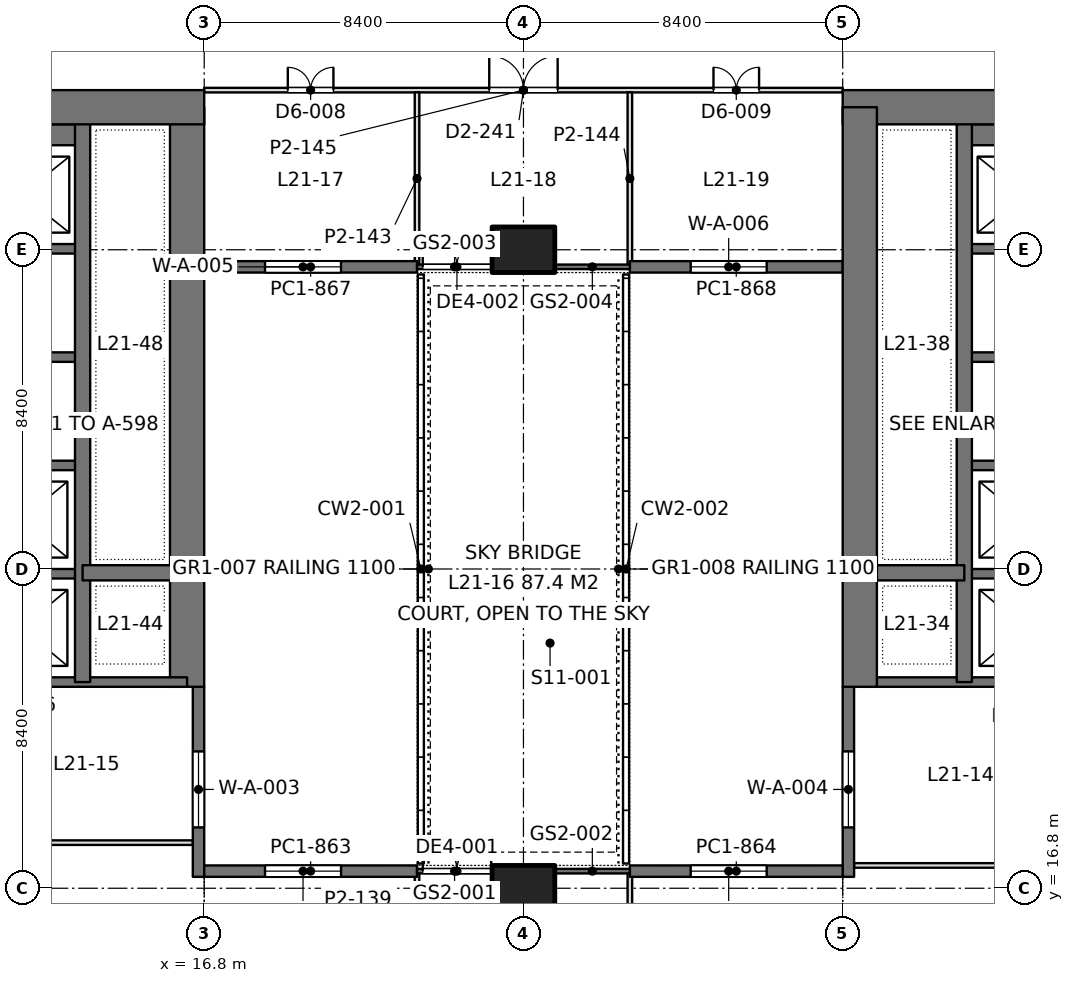
"""IFC4 building model, lengths in metres.
Left out: names, types, materials, properties, quantities, classifications, styles, units other than length and angle.
Written with IfcOpenShell. Run it as: python <this file> out.ifc"""

import sys

from ifc_helpers import new_model, si_unit, direction, frame, frame_2d, origin, origin_2d, place, context, subcontext, project, spatial, rectangle, extrude, element, fill, save


model = new_model("IFC4")
c1 = context("Model", 3, precision=1e-05, world=origin(), true_north=direction((0.0, 1.0)))
c2 = subcontext(c1, "Body", "Model", "MODEL_VIEW")
j1 = project(units=[si_unit("LENGTHUNIT", "METRE"), si_unit("PLANEANGLEUNIT", "RADIAN")], contexts=[c1])
p1 = place(None, origin())
s1 = spatial("IfcSite", under=j1, at=p1, CompositionType="ELEMENT")
p2 = place(p1, origin())
s2 = spatial("IfcBuilding", under=s1, at=p2, CompositionType="ELEMENT")
p3 = place(p2, frame((0.0, 0.0, 96.3)))
s3 = spatial("IfcBuildingStorey", under=s2, at=p3, CompositionType="ELEMENT", Elevation=96.3)
for number, where, z_axis, x_axis in (
    (1, (25.2, 16.8, 0.0), (0.0, 0.0, 1.0), (1.0, 0.0, 0.0)),
    (2, (25.2, 33.6, 0.0), (0.0, 0.0, 1.0), (1.0, 0.0, 0.0)),
):
    element("IfcColumn", number, at=place(p3, frame(where, z_axis=z_axis, x_axis=x_axis)), inside=s3, PredefinedType="COLUMN", context=c2, shape_type="SweptSolid", body=[
        extrude(rectangle(XDim=1.65, YDim=1.2, at=origin_2d()), origin(), (0.0, 0.0, 1.0), 4.5),
    ])
p4 = place(p3, frame((-1.2, 37.35, 0.0), z_axis=(0.0, 0.0, 1.0), x_axis=(1.0, 0.0, 0.0)))
e3 = element("IfcWall", 3, at=p4, inside=s3, PredefinedType="SHEAR", context=c2, shape_type="SweptSolid", body=[
    extrude(rectangle(XDim=18.0, YDim=0.9, at=frame_2d((9.0, 0.0))), origin(), (0.0, 0.0, 1.0), 4.5),
])
p5 = place(p4, frame((8.95, 0.0, 0.0)))
e4 = element("IfcOpeningElement", 4, at=p5, cuts=e3, PredefinedType="OPENING", context=c2, shape_type="SweptSolid", body=[
    extrude(rectangle(XDim=1.8, YDim=2.4, at=frame_2d((0.9, 1.2))), frame((0.0, 0.46, 0.0), z_axis=(0.0, -1.0, 0.0), x_axis=(1.0, 0.0, 0.0)), (0.0, 0.0, 1.0), 0.92),
])
p6 = place(p3, frame((16.35, 22.1, 0.0), z_axis=(0.0, 0.0, 1.0), x_axis=(0.0, 1.0, 0.0)))
e5 = element("IfcWall", 5, at=p6, inside=s3, PredefinedType="SHEAR", context=c2, shape_type="SweptSolid", body=[
    extrude(rectangle(XDim=15.25, YDim=0.9, at=frame_2d((7.625, 0.0))), origin(), (0.0, 0.0, 1.0), 4.5),
])
p7 = place(p3, frame((13.6, 22.225, 0.0), z_axis=(0.0, 0.0, 1.0), x_axis=(0.0, 1.0, 0.0)))
e6 = element("IfcWall", 6, at=p7, inside=s3, PredefinedType="SHEAR", context=c2, shape_type="SweptSolid", body=[
    extrude(rectangle(XDim=15.125, YDim=0.4, at=frame_2d((7.562, 0.0))), origin(), (0.0, 0.0, 1.0), 4.5),
])
p8 = place(p3, frame((13.6, 25.1, 0.0), z_axis=(0.0, 0.0, 1.0), x_axis=(1.0, 0.0, 0.0)))
e7 = element("IfcWall", 7, at=p8, inside=s3, PredefinedType="SHEAR", context=c2, shape_type="SweptSolid", body=[
    extrude(rectangle(XDim=2.75, YDim=0.4, at=frame_2d((1.375, 0.0))), origin(), (0.0, 0.0, 1.0), 4.5),
])
p9 = place(p3, frame((10.4, 22.225, 0.0), z_axis=(0.0, 0.0, 1.0), x_axis=(1.0, 0.0, 0.0)))
e8 = element("IfcWall", 8, at=p9, inside=s3, PredefinedType="SHEAR", context=c2, shape_type="SweptSolid", body=[
    extrude(rectangle(XDim=5.95, YDim=0.25, at=frame_2d((2.975, 0.0))), origin(), (0.0, 0.0, 1.0), 4.5),
])
for number, where, z_axis, x_axis in (
    (9, (10.4, 25.075, 0.0), (0.0, 0.0, 1.0), (1.0, 0.0, 0.0)),
    (10, (10.4, 27.925, 0.0), (0.0, 0.0, 1.0), (1.0, 0.0, 0.0)),
    (11, (10.4, 30.775, 0.0), (0.0, 0.0, 1.0), (1.0, 0.0, 0.0)),
    (12, (10.4, 33.625, 0.0), (0.0, 0.0, 1.0), (1.0, 0.0, 0.0)),
):
    element("IfcWall", number, at=place(p3, frame(where, z_axis=z_axis, x_axis=x_axis)), inside=s3, PredefinedType="SHEAR", context=c2, shape_type="SweptSolid", body=[
        extrude(rectangle(XDim=3.2, YDim=0.25, at=frame_2d((1.6, 0.0))), origin(), (0.0, 0.0, 1.0), 4.5),
    ])
p10 = place(p3, frame((10.4, 36.625, 0.0), z_axis=(0.0, 0.0, 1.0), x_axis=(1.0, 0.0, 0.0)))
e13 = element("IfcWall", 13, at=p10, inside=s3, PredefinedType="SHEAR", context=c2, shape_type="SweptSolid", body=[
    extrude(rectangle(XDim=3.2, YDim=0.55, at=frame_2d((1.6, 0.0))), origin(), (0.0, 0.0, 1.0), 4.5),
])
p11 = place(p3, frame((33.6, 37.35, 0.0), z_axis=(0.0, 0.0, 1.0), x_axis=(1.0, 0.0, 0.0)))
e14 = element("IfcWall", 14, at=p11, inside=s3, PredefinedType="SHEAR", context=c2, shape_type="SweptSolid", body=[
    extrude(rectangle(XDim=18.0, YDim=0.9, at=frame_2d((9.0, 0.0))), origin(), (0.0, 0.0, 1.0), 4.5),
])
p12 = place(p11, frame((7.25, 0.0, 0.0)))
e15 = element("IfcOpeningElement", 15, at=p12, cuts=e14, PredefinedType="OPENING", context=c2, shape_type="SweptSolid", body=[
    extrude(rectangle(XDim=1.8, YDim=2.4, at=frame_2d((0.9, 1.2))), frame((0.0, 0.46, 0.0), z_axis=(0.0, -1.0, 0.0), x_axis=(1.0, 0.0, 0.0)), (0.0, 0.0, 1.0), 0.92),
])
p13 = place(p3, frame((34.05, 22.1, 0.0), z_axis=(0.0, 0.0, 1.0), x_axis=(0.0, 1.0, 0.0)))
e16 = element("IfcWall", 16, at=p13, inside=s3, PredefinedType="SHEAR", context=c2, shape_type="SweptSolid", body=[
    extrude(rectangle(XDim=15.25, YDim=0.9, at=frame_2d((7.625, 0.0))), origin(), (0.0, 0.0, 1.0), 4.5),
])
p14 = place(p3, frame((36.8, 22.225, 0.0), z_axis=(0.0, 0.0, 1.0), x_axis=(0.0, 1.0, 0.0)))
e17 = element("IfcWall", 17, at=p14, inside=s3, PredefinedType="SHEAR", context=c2, shape_type="SweptSolid", body=[
    extrude(rectangle(XDim=15.125, YDim=0.4, at=frame_2d((7.562, 0.0))), origin(), (0.0, 0.0, 1.0), 4.5),
])
p15 = place(p3, frame((36.8, 25.1, 0.0), z_axis=(0.0, 0.0, 1.0), x_axis=(-1.0, 0.0, 0.0)))
e18 = element("IfcWall", 18, at=p15, inside=s3, PredefinedType="SHEAR", context=c2, shape_type="SweptSolid", body=[
    extrude(rectangle(XDim=2.75, YDim=0.4, at=frame_2d((1.375, 0.0))), origin(), (0.0, 0.0, 1.0), 4.5),
])
p16 = place(p3, frame((40.0, 22.225, 0.0), z_axis=(0.0, 0.0, 1.0), x_axis=(-1.0, 0.0, 0.0)))
e19 = element("IfcWall", 19, at=p16, inside=s3, PredefinedType="SHEAR", context=c2, shape_type="SweptSolid", body=[
    extrude(rectangle(XDim=5.95, YDim=0.25, at=frame_2d((2.975, 0.0))), origin(), (0.0, 0.0, 1.0), 4.5),
])
for number, where, z_axis, x_axis in (
    (20, (40.0, 25.075, 0.0), (0.0, 0.0, 1.0), (-1.0, 0.0, 0.0)),
    (21, (40.0, 27.925, 0.0), (0.0, 0.0, 1.0), (-1.0, 0.0, 0.0)),
    (22, (40.0, 30.775, 0.0), (0.0, 0.0, 1.0), (-1.0, 0.0, 0.0)),
    (23, (40.0, 33.625, 0.0), (0.0, 0.0, 1.0), (-1.0, 0.0, 0.0)),
):
    element("IfcWall", number, at=place(p3, frame(where, z_axis=z_axis, x_axis=x_axis)), inside=s3, PredefinedType="SHEAR", context=c2, shape_type="SweptSolid", body=[
        extrude(rectangle(XDim=3.2, YDim=0.25, at=frame_2d((1.6, 0.0))), origin(), (0.0, 0.0, 1.0), 4.5),
    ])
p17 = place(p3, frame((40.0, 36.625, 0.0), z_axis=(0.0, 0.0, 1.0), x_axis=(-1.0, 0.0, 0.0)))
e24 = element("IfcWall", 24, at=p17, inside=s3, PredefinedType="SHEAR", context=c2, shape_type="SweptSolid", body=[
    extrude(rectangle(XDim=3.2, YDim=0.55, at=frame_2d((1.6, 0.0))), origin(), (0.0, 0.0, 1.0), 4.5),
])
p18 = place(p3, frame((16.65, 17.1, 0.0), z_axis=(0.0, 0.0, 1.0), x_axis=(0.0, 1.0, 0.0)))
e25 = element("IfcWall", 25, at=p18, inside=s3, PredefinedType="SOLIDWALL", context=c2, shape_type="SweptSolid", body=[
    extrude(rectangle(XDim=5.0, YDim=0.3, at=frame_2d((2.5, 0.0))), origin(), (0.0, 0.0, 1.0), 4.35),
])
p19 = place(p18, frame((1.3, 0.0, 0.1)))
e26 = element("IfcOpeningElement", 26, at=p19, cuts=e25, PredefinedType="OPENING", context=c2, shape_type="SweptSolid", body=[
    extrude(rectangle(XDim=2.0, YDim=3.0, at=frame_2d((1.0, 1.5))), frame((0.0, 0.16, 0.0), z_axis=(0.0, -1.0, 0.0), x_axis=(1.0, 0.0, 0.0)), (0.0, 0.0, 1.0), 0.32),
])
p20 = place(p3, frame((33.75, 17.1, 0.0), z_axis=(0.0, 0.0, 1.0), x_axis=(0.0, 1.0, 0.0)))
e27 = element("IfcWall", 27, at=p20, inside=s3, PredefinedType="SOLIDWALL", context=c2, shape_type="SweptSolid", body=[
    extrude(rectangle(XDim=5.0, YDim=0.3, at=frame_2d((2.5, 0.0))), origin(), (0.0, 0.0, 1.0), 4.35),
])
p21 = place(p20, frame((1.3, 0.0, 0.1)))
e28 = element("IfcOpeningElement", 28, at=p21, cuts=e27, PredefinedType="OPENING", context=c2, shape_type="SweptSolid", body=[
    extrude(rectangle(XDim=2.0, YDim=3.0, at=frame_2d((1.0, 1.5))), frame((0.0, 0.16, 0.0), z_axis=(0.0, -1.0, 0.0), x_axis=(1.0, 0.0, 0.0)), (0.0, 0.0, 1.0), 0.32),
])
p22 = place(p3, frame((16.8, 17.25, 0.0), z_axis=(0.0, 0.0, 1.0), x_axis=(1.0, 0.0, 0.0)))
e29 = element("IfcWall", 29, at=p22, inside=s3, PredefinedType="SOLIDWALL", context=c2, shape_type="SweptSolid", body=[
    extrude(rectangle(XDim=5.6, YDim=0.3, at=frame_2d((2.8, 0.0))), origin(), (0.0, 0.0, 1.0), 4.35),
])
p23 = place(p22, frame((1.6, 0.0, 0.1)))
e30 = element("IfcOpeningElement", 30, at=p23, cuts=e29, PredefinedType="OPENING", context=c2, shape_type="SweptSolid", body=[
    extrude(rectangle(XDim=2.0, YDim=3.0, at=frame_2d((1.0, 1.5))), frame((0.0, 0.16, 0.0), z_axis=(0.0, -1.0, 0.0), x_axis=(1.0, 0.0, 0.0)), (0.0, 0.0, 1.0), 0.32),
])
p24 = place(p3, frame((22.4, 17.25, 0.0), z_axis=(0.0, 0.0, 1.0), x_axis=(1.0, 0.0, 0.0)))
e31 = element("IfcWall", 31, at=p24, inside=s3, PredefinedType="SOLIDWALL", context=c2, shape_type="SweptSolid", body=[
    extrude(rectangle(XDim=1.975, YDim=0.12, at=frame_2d((0.988, 0.0))), origin(), (0.0, 0.0, 1.0), 4.35),
])
p25 = place(p24, frame((0.15, 0.0, 0.0)))
e32 = element("IfcOpeningElement", 32, at=p25, cuts=e31, PredefinedType="OPENING", context=c2, shape_type="SweptSolid", body=[
    extrude(rectangle(XDim=1.8, YDim=2.4, at=frame_2d((0.9, 1.2))), frame((0.0, 0.07, 0.0), z_axis=(0.0, -1.0, 0.0), x_axis=(1.0, 0.0, 0.0)), (0.0, 0.0, 1.0), 0.14),
])
p26 = place(p3, frame((26.025, 17.25, 0.0), z_axis=(0.0, 0.0, 1.0), x_axis=(1.0, 0.0, 0.0)))
e33 = element("IfcWall", 33, at=p26, inside=s3, PredefinedType="SOLIDWALL", context=c2, shape_type="SweptSolid", body=[
    extrude(rectangle(XDim=1.975, YDim=0.12, at=frame_2d((0.988, 0.0))), origin(), (0.0, 0.0, 1.0), 4.35),
])
p27 = place(p3, frame((28.0, 17.25, 0.0), z_axis=(0.0, 0.0, 1.0), x_axis=(1.0, 0.0, 0.0)))
e34 = element("IfcWall", 34, at=p27, inside=s3, PredefinedType="SOLIDWALL", context=c2, shape_type="SweptSolid", body=[
    extrude(rectangle(XDim=5.6, YDim=0.3, at=frame_2d((2.8, 0.0))), origin(), (0.0, 0.0, 1.0), 4.35),
])
p28 = place(p27, frame((1.6, 0.0, 0.1)))
e35 = element("IfcOpeningElement", 35, at=p28, cuts=e34, PredefinedType="OPENING", context=c2, shape_type="SweptSolid", body=[
    extrude(rectangle(XDim=2.0, YDim=3.0, at=frame_2d((1.0, 1.5))), frame((0.0, 0.16, 0.0), z_axis=(0.0, -1.0, 0.0), x_axis=(1.0, 0.0, 0.0)), (0.0, 0.0, 1.0), 0.32),
])
p29 = place(p3, frame((16.8, 33.15, 0.0), z_axis=(0.0, 0.0, 1.0), x_axis=(1.0, 0.0, 0.0)))
e36 = element("IfcWall", 36, at=p29, inside=s3, PredefinedType="SOLIDWALL", context=c2, shape_type="SweptSolid", body=[
    extrude(rectangle(XDim=5.6, YDim=0.3, at=frame_2d((2.8, 0.0))), origin(), (0.0, 0.0, 1.0), 4.35),
])
p30 = place(p29, frame((1.6, 0.0, 0.1)))
e37 = element("IfcOpeningElement", 37, at=p30, cuts=e36, PredefinedType="OPENING", context=c2, shape_type="SweptSolid", body=[
    extrude(rectangle(XDim=2.0, YDim=3.0, at=frame_2d((1.0, 1.5))), frame((0.0, 0.16, 0.0), z_axis=(0.0, -1.0, 0.0), x_axis=(1.0, 0.0, 0.0)), (0.0, 0.0, 1.0), 0.32),
])
p31 = place(p3, frame((22.4, 33.15, 0.0), z_axis=(0.0, 0.0, 1.0), x_axis=(1.0, 0.0, 0.0)))
e38 = element("IfcWall", 38, at=p31, inside=s3, PredefinedType="SOLIDWALL", context=c2, shape_type="SweptSolid", body=[
    extrude(rectangle(XDim=1.975, YDim=0.12, at=frame_2d((0.988, 0.0))), origin(), (0.0, 0.0, 1.0), 4.35),
])
p32 = place(p31, frame((0.15, 0.0, 0.0)))
e39 = element("IfcOpeningElement", 39, at=p32, cuts=e38, PredefinedType="OPENING", context=c2, shape_type="SweptSolid", body=[
    extrude(rectangle(XDim=1.8, YDim=2.4, at=frame_2d((0.9, 1.2))), frame((0.0, 0.07, 0.0), z_axis=(0.0, -1.0, 0.0), x_axis=(1.0, 0.0, 0.0)), (0.0, 0.0, 1.0), 0.14),
])
p33 = place(p3, frame((26.025, 33.15, 0.0), z_axis=(0.0, 0.0, 1.0), x_axis=(1.0, 0.0, 0.0)))
e40 = element("IfcWall", 40, at=p33, inside=s3, PredefinedType="SOLIDWALL", context=c2, shape_type="SweptSolid", body=[
    extrude(rectangle(XDim=1.975, YDim=0.12, at=frame_2d((0.988, 0.0))), origin(), (0.0, 0.0, 1.0), 4.35),
])
p34 = place(p3, frame((28.0, 33.15, 0.0), z_axis=(0.0, 0.0, 1.0), x_axis=(1.0, 0.0, 0.0)))
e41 = element("IfcWall", 41, at=p34, inside=s3, PredefinedType="SOLIDWALL", context=c2, shape_type="SweptSolid", body=[
    extrude(rectangle(XDim=5.6, YDim=0.3, at=frame_2d((2.8, 0.0))), origin(), (0.0, 0.0, 1.0), 4.35),
])
p35 = place(p34, frame((1.6, 0.0, 0.1)))
e42 = element("IfcOpeningElement", 42, at=p35, cuts=e41, PredefinedType="OPENING", context=c2, shape_type="SweptSolid", body=[
    extrude(rectangle(XDim=2.0, YDim=3.0, at=frame_2d((1.0, 1.5))), frame((0.0, 0.16, 0.0), z_axis=(0.0, -1.0, 0.0), x_axis=(1.0, 0.0, 0.0)), (0.0, 0.0, 1.0), 0.32),
])
for number, where, z_axis, x_axis in (
    (43, (10.598, 18.0, 0.0), (0.0, 0.0, 1.0), (1.0, 0.0, 0.0)),
    (44, (33.898, 17.4, 0.0), (0.0, 0.0, 1.0), (1.0, 0.0, 0.0)),
):
    element("IfcWall", number, at=place(p3, frame(where, z_axis=z_axis, x_axis=x_axis)), inside=s3, PredefinedType="PARTITIONING", context=c2, shape_type="SweptSolid", body=[
        extrude(rectangle(XDim=5.904, YDim=0.12, at=frame_2d((2.952, 0.0))), origin(), (0.0, 0.0, 1.0), 3.85),
    ])
for number, where, z_axis, x_axis in (
    (45, (22.4, 12.658, 0.0), (0.0, 0.0, 1.0), (0.0, 1.0, 0.0)),
    (46, (28.0, 12.658, 0.0), (0.0, 0.0, 1.0), (0.0, 1.0, 0.0)),
):
    element("IfcWall", number, at=place(p3, frame(where, z_axis=z_axis, x_axis=x_axis)), inside=s3, PredefinedType="PARTITIONING", context=c2, shape_type="SweptSolid", body=[
        extrude(rectangle(XDim=4.534, YDim=0.12, at=frame_2d((2.267, 0.0))), origin(), (0.0, 0.0, 1.0), 3.5),
    ])
p36 = place(p3, frame((16.798, 37.8, 0.0), z_axis=(0.0, 0.0, 1.0), x_axis=(1.0, 0.0, 0.0)))
e47 = element("IfcWall", 47, at=p36, inside=s3, PredefinedType="PARTITIONING", context=c2, shape_type="SweptSolid", body=[
    extrude(rectangle(XDim=16.804, YDim=0.12, at=frame_2d((8.402, 0.0))), origin(), (0.0, 0.0, 1.0), 3.85),
])
p37 = place(p36, frame((2.202, 0.0, 0.0)))
e48 = element("IfcOpeningElement", 48, at=p37, cuts=e47, PredefinedType="OPENING", context=c2, shape_type="SweptSolid", body=[
    extrude(rectangle(XDim=1.2, YDim=2.2, at=frame_2d((0.6, 1.1))), frame((0.0, 0.07, 0.0), z_axis=(0.0, -1.0, 0.0), x_axis=(1.0, 0.0, 0.0)), (0.0, 0.0, 1.0), 0.14),
])
p38 = place(p36, frame((7.502, 0.0, 0.0)))
e49 = element("IfcOpeningElement", 49, at=p38, cuts=e47, PredefinedType="OPENING", context=c2, shape_type="SweptSolid", body=[
    extrude(rectangle(XDim=1.8, YDim=2.2, at=frame_2d((0.9, 1.1))), frame((0.0, 0.07, 0.0), z_axis=(0.0, -1.0, 0.0), x_axis=(1.0, 0.0, 0.0)), (0.0, 0.0, 1.0), 0.14),
])
p39 = place(p36, frame((13.402, 0.0, 0.0)))
e50 = element("IfcOpeningElement", 50, at=p39, cuts=e47, PredefinedType="OPENING", context=c2, shape_type="SweptSolid", body=[
    extrude(rectangle(XDim=1.2, YDim=2.2, at=frame_2d((0.6, 1.1))), frame((0.0, 0.07, 0.0), z_axis=(0.0, -1.0, 0.0), x_axis=(1.0, 0.0, 0.0)), (0.0, 0.0, 1.0), 0.14),
])
for number, where, z_axis, x_axis in (
    (51, (22.4, 33.208, 0.0), (0.0, 0.0, 1.0), (0.0, 1.0, 0.0)),
    (52, (28.0, 33.208, 0.0), (0.0, 0.0, 1.0), (0.0, 1.0, 0.0)),
):
    element("IfcWall", number, at=place(p3, frame(where, z_axis=z_axis, x_axis=x_axis)), inside=s3, PredefinedType="PARTITIONING", context=c2, shape_type="SweptSolid", body=[
        extrude(rectangle(XDim=4.534, YDim=0.12, at=frame_2d((2.267, 0.0))), origin(), (0.0, 0.0, 1.0), 3.5),
    ])
p40 = place(p19, origin())
e53 = element("IfcWindow", 53, at=p40, inside=s3, PartitioningType="SINGLE_PANEL", PredefinedType="WINDOW", context=c2, shape_type="SweptSolid", body=[
    extrude(rectangle(XDim=2.0, YDim=3.0, at=frame_2d((1.0, 1.5))), frame((0.0, 0.03, 0.0), z_axis=(0.0, -1.0, 0.0), x_axis=(1.0, 0.0, 0.0)), (0.0, 0.0, 1.0), 0.06),
])
fill(e26, e53)
p41 = place(p21, origin())
e54 = element("IfcWindow", 54, at=p41, inside=s3, PartitioningType="SINGLE_PANEL", PredefinedType="WINDOW", context=c2, shape_type="SweptSolid", body=[
    extrude(rectangle(XDim=2.0, YDim=3.0, at=frame_2d((1.0, 1.5))), frame((0.0, 0.03, 0.0), z_axis=(0.0, -1.0, 0.0), x_axis=(1.0, 0.0, 0.0)), (0.0, 0.0, 1.0), 0.06),
])
fill(e28, e54)
p42 = place(p23, origin())
e55 = element("IfcWindow", 55, at=p42, inside=s3, PartitioningType="SINGLE_PANEL", PredefinedType="WINDOW", context=c2, shape_type="SweptSolid", body=[
    extrude(rectangle(XDim=2.0, YDim=3.0, at=frame_2d((1.0, 1.5))), frame((0.0, 0.03, 0.0), z_axis=(0.0, -1.0, 0.0), x_axis=(1.0, 0.0, 0.0)), (0.0, 0.0, 1.0), 0.06),
])
fill(e30, e55)
p43 = place(p25, origin())
e56 = element("IfcDoor", 56, at=p43, inside=s3, OperationType="DOUBLE_DOOR_SINGLE_SWING", PredefinedType="DOOR", context=c2, shape_type="SweptSolid", body=[
    extrude(rectangle(XDim=1.8, YDim=2.4, at=frame_2d((0.9, 1.2))), frame((0.0, 0.025, 0.0), z_axis=(0.0, -1.0, 0.0), x_axis=(1.0, 0.0, 0.0)), (0.0, 0.0, 1.0), 0.05),
])
fill(e32, e56)
p44 = place(p28, origin())
e57 = element("IfcWindow", 57, at=p44, inside=s3, PartitioningType="SINGLE_PANEL", PredefinedType="WINDOW", context=c2, shape_type="SweptSolid", body=[
    extrude(rectangle(XDim=2.0, YDim=3.0, at=frame_2d((1.0, 1.5))), frame((0.0, 0.03, 0.0), z_axis=(0.0, -1.0, 0.0), x_axis=(1.0, 0.0, 0.0)), (0.0, 0.0, 1.0), 0.06),
])
fill(e35, e57)
p45 = place(p30, origin())
e58 = element("IfcWindow", 58, at=p45, inside=s3, PartitioningType="SINGLE_PANEL", PredefinedType="WINDOW", context=c2, shape_type="SweptSolid", body=[
    extrude(rectangle(XDim=2.0, YDim=3.0, at=frame_2d((1.0, 1.5))), frame((0.0, 0.03, 0.0), z_axis=(0.0, -1.0, 0.0), x_axis=(1.0, 0.0, 0.0)), (0.0, 0.0, 1.0), 0.06),
])
fill(e37, e58)
p46 = place(p32, origin())
e59 = element("IfcDoor", 59, at=p46, inside=s3, OperationType="DOUBLE_DOOR_SINGLE_SWING", PredefinedType="DOOR", context=c2, shape_type="SweptSolid", body=[
    extrude(rectangle(XDim=1.8, YDim=2.4, at=frame_2d((0.9, 1.2))), frame((0.0, 0.025, 0.0), z_axis=(0.0, -1.0, 0.0), x_axis=(1.0, 0.0, 0.0)), (0.0, 0.0, 1.0), 0.05),
])
fill(e39, e59)
p47 = place(p35, origin())
e60 = element("IfcWindow", 60, at=p47, inside=s3, PartitioningType="SINGLE_PANEL", PredefinedType="WINDOW", context=c2, shape_type="SweptSolid", body=[
    extrude(rectangle(XDim=2.0, YDim=3.0, at=frame_2d((1.0, 1.5))), frame((0.0, 0.03, 0.0), z_axis=(0.0, -1.0, 0.0), x_axis=(1.0, 0.0, 0.0)), (0.0, 0.0, 1.0), 0.06),
])
fill(e42, e60)
p48 = place(p37, origin())
e61 = element("IfcDoor", 61, at=p48, inside=s3, OperationType="DOUBLE_DOOR_SINGLE_SWING_OPPOSITE_LEFT", PredefinedType="DOOR", context=c2, shape_type="SweptSolid", body=[
    extrude(rectangle(XDim=1.2, YDim=2.2, at=frame_2d((0.6, 1.1))), frame((0.0, 0.025, 0.0), z_axis=(0.0, -1.0, 0.0), x_axis=(1.0, 0.0, 0.0)), (0.0, 0.0, 1.0), 0.05),
])
fill(e48, e61)
p49 = place(p38, origin())
e62 = element("IfcDoor", 62, at=p49, inside=s3, OperationType="DOUBLE_DOOR_SINGLE_SWING", PredefinedType="DOOR", context=c2, shape_type="SweptSolid", body=[
    extrude(rectangle(XDim=1.8, YDim=2.2, at=frame_2d((0.9, 1.1))), frame((0.0, 0.025, 0.0), z_axis=(0.0, -1.0, 0.0), x_axis=(1.0, 0.0, 0.0)), (0.0, 0.0, 1.0), 0.05),
])
fill(e49, e62)
p50 = place(p39, origin())
e63 = element("IfcDoor", 63, at=p50, inside=s3, OperationType="DOUBLE_DOOR_SINGLE_SWING_OPPOSITE_LEFT", PredefinedType="DOOR", context=c2, shape_type="SweptSolid", body=[
    extrude(rectangle(XDim=1.2, YDim=2.2, at=frame_2d((0.6, 1.1))), frame((0.0, 0.025, 0.0), z_axis=(0.0, -1.0, 0.0), x_axis=(1.0, 0.0, 0.0)), (0.0, 0.0, 1.0), 0.05),
])
fill(e50, e63)
save(model, sys.argv[1])
